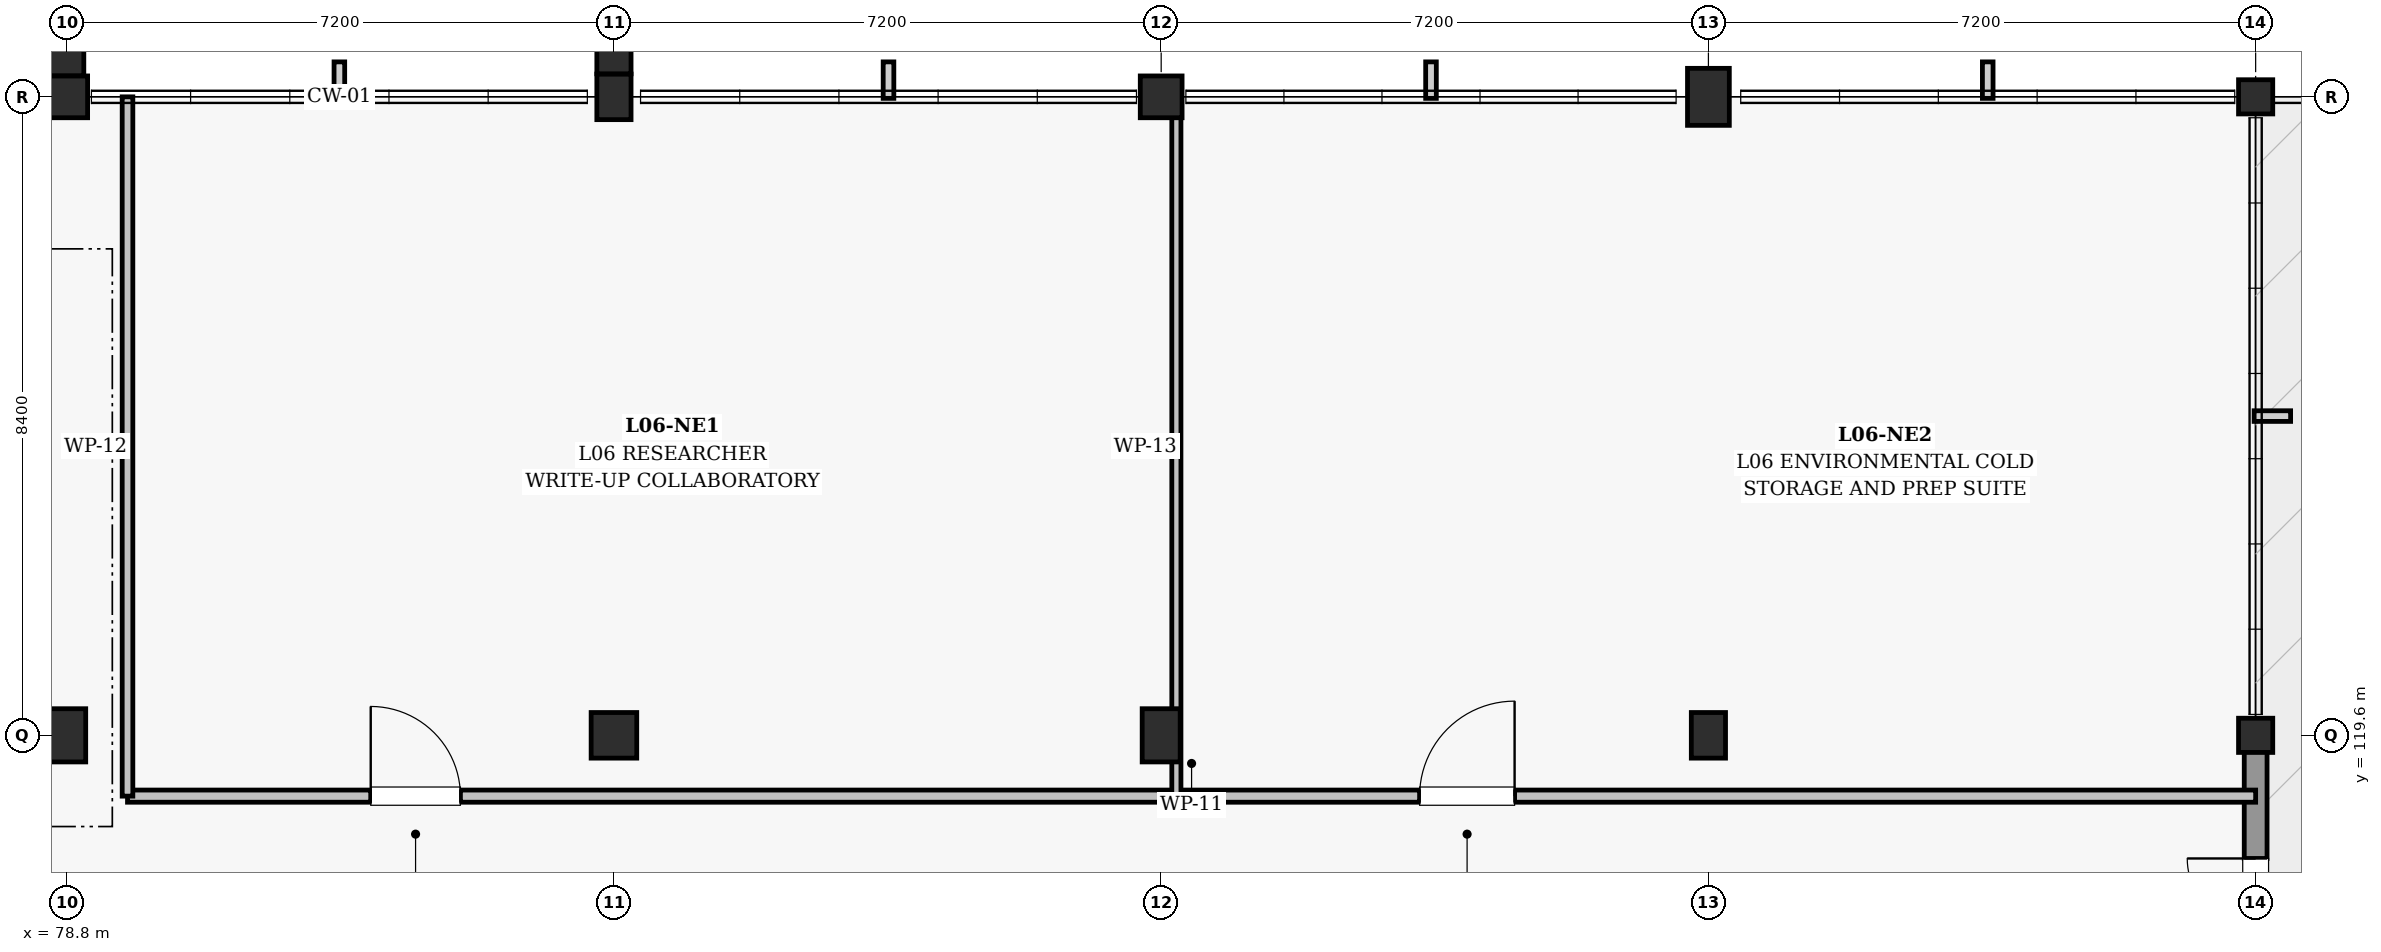
"""IFC4 building model, lengths in metres.
Left out: names, types, materials, properties, quantities, classifications, styles, units other than length and angle.
Written with IfcOpenShell. Run it as: python <this file> out.ifc"""

import sys

from ifc_helpers import new_model, si_unit, direction, frame, frame_2d, origin, origin_2d, place, context, subcontext, project, spatial, rectangle, extrude, element, fill, save


model = new_model("IFC4")
c1 = context("Model", 3, precision=1e-05, world=origin(), true_north=direction((0.0, 1.0)))
c2 = subcontext(c1, "Body", "Model", "MODEL_VIEW")
j1 = project(units=[si_unit("LENGTHUNIT", "METRE"), si_unit("PLANEANGLEUNIT", "RADIAN")], contexts=[c1])
p1 = place(None, origin())
s1 = spatial("IfcSite", under=j1, at=p1, CompositionType="ELEMENT")
p2 = place(p1, origin())
s2 = spatial("IfcBuilding", under=s1, at=p2, CompositionType="ELEMENT")
p3 = place(p2, frame((0.0, 0.0, 27.9)))
s3 = spatial("IfcBuildingStorey", under=s2, at=p3, CompositionType="ELEMENT", Elevation=27.9)
p4 = place(p3, frame((78.8, 119.6, 0.0), z_axis=(0.0, 0.0, 1.0), x_axis=(1.0, 0.0, 0.0)))
e1 = element("IfcColumn", 1, at=p4, inside=s3, PredefinedType="COLUMN", context=c2, shape_type="SweptSolid", body=[
    extrude(rectangle(XDim=0.5, YDim=0.7, at=origin_2d()), origin(), (0.0, 0.0, 1.0), 4.5),
])
p5 = place(p3, frame((78.8, 128.0, 0.0), z_axis=(0.0, 0.0, 1.0), x_axis=(1.0, 0.0, 0.0)))
e2 = element("IfcColumn", 2, at=p5, inside=s3, PredefinedType="COLUMN", context=c2, shape_type="SweptSolid", body=[
    extrude(rectangle(XDim=0.55, YDim=0.55, at=origin_2d()), origin(), (0.0, 0.0, 1.0), 4.5),
])
p6 = place(p3, frame((86.0, 119.6, 0.0), z_axis=(0.0, 0.0, 1.0), x_axis=(1.0, 0.0, 0.0)))
e3 = element("IfcColumn", 3, at=p6, inside=s3, PredefinedType="COLUMN", context=c2, shape_type="SweptSolid", body=[
    extrude(rectangle(XDim=0.6, YDim=0.6, at=origin_2d()), origin(), (0.0, 0.0, 1.0), 4.5),
])
p7 = place(p3, frame((86.0, 128.0, 0.0), z_axis=(0.0, 0.0, 1.0), x_axis=(1.0, 0.0, 0.0)))
e4 = element("IfcColumn", 4, at=p7, inside=s3, PredefinedType="COLUMN", context=c2, shape_type="SweptSolid", body=[
    extrude(rectangle(XDim=0.45, YDim=0.6, at=origin_2d()), origin(), (0.0, 0.0, 1.0), 4.5),
])
p8 = place(p3, frame((93.2, 119.6, 0.0), z_axis=(0.0, 0.0, 1.0), x_axis=(1.0, 0.0, 0.0)))
e5 = element("IfcColumn", 5, at=p8, inside=s3, PredefinedType="COLUMN", context=c2, shape_type="SweptSolid", body=[
    extrude(rectangle(XDim=0.5, YDim=0.7, at=origin_2d()), origin(), (0.0, 0.0, 1.0), 4.5),
])
p9 = place(p3, frame((93.2, 128.0, 0.0), z_axis=(0.0, 0.0, 1.0), x_axis=(1.0, 0.0, 0.0)))
e6 = element("IfcColumn", 6, at=p9, inside=s3, PredefinedType="COLUMN", context=c2, shape_type="SweptSolid", body=[
    extrude(rectangle(XDim=0.55, YDim=0.55, at=origin_2d()), origin(), (0.0, 0.0, 1.0), 4.5),
])
p10 = place(p3, frame((100.4, 119.6, 0.0), z_axis=(0.0, 0.0, 1.0), x_axis=(1.0, 0.0, 0.0)))
e7 = element("IfcColumn", 7, at=p10, inside=s3, PredefinedType="COLUMN", context=c2, shape_type="SweptSolid", body=[
    extrude(rectangle(XDim=0.45, YDim=0.6, at=origin_2d()), origin(), (0.0, 0.0, 1.0), 4.5),
])
p11 = place(p3, frame((100.4, 128.0, 0.0), z_axis=(0.0, 0.0, 1.0), x_axis=(1.0, 0.0, 0.0)))
e8 = element("IfcColumn", 8, at=p11, inside=s3, PredefinedType="COLUMN", context=c2, shape_type="SweptSolid", body=[
    extrude(rectangle(XDim=0.55, YDim=0.75, at=origin_2d()), origin(), (0.0, 0.0, 1.0), 4.5),
])
for number, where, z_axis, x_axis in (
    (9, (107.6, 119.6, 0.0), (0.0, 0.0, 1.0), (1.0, 0.0, 0.0)),
    (10, (107.6, 128.0, 0.0), (0.0, 0.0, 1.0), (1.0, 0.0, 0.0)),
):
    element("IfcColumn", number, at=place(p3, frame(where, z_axis=z_axis, x_axis=x_axis)), inside=s3, PredefinedType="COLUMN", context=c2, shape_type="SweptSolid", body=[
        extrude(rectangle(XDim=0.45, YDim=0.45, at=origin_2d()), origin(), (0.0, 0.0, 1.0), 4.5),
    ])
for number, where, z_axis, x_axis in (
    (11, (78.8, 128.603, 0.0), (0.0, 0.0, 1.0), (1.0, 0.0, 0.0)),
    (12, (86.0, 128.628, 0.0), (0.0, 0.0, 1.0), (1.0, 0.0, 0.0)),
):
    element("IfcColumn", number, at=place(p3, frame(where, z_axis=z_axis, x_axis=x_axis)), inside=s3, PredefinedType="PILASTER", context=c2, shape_type="SweptSolid", body=[
        extrude(rectangle(XDim=0.45, YDim=0.65, at=origin_2d()), origin(), (0.0, 0.0, 1.0), 4.5),
    ])
p12 = place(p3, frame((107.6, 111.38, 0.0), z_axis=(0.0, 0.0, 1.0), x_axis=(0.0, 1.0, 0.0)))
e13 = element("IfcWall", 13, at=p12, inside=s3, PredefinedType="SOLIDWALL", context=c2, shape_type="SweptSolid", body=[
    extrude(rectangle(XDim=8.015, YDim=0.3, at=frame_2d((4.008, 0.0))), origin(), (0.0, 0.0, 1.0), 2.955),
])
p13 = place(p12, frame((4.8, 0.0, 0.0)))
e14 = element("IfcOpeningElement", 14, at=p13, cuts=e13, PredefinedType="OPENING", context=c2, shape_type="SweptSolid", body=[
    extrude(rectangle(XDim=1.8, YDim=2.3, at=frame_2d((0.9, 1.15))), frame((0.0, 0.16, 0.0), z_axis=(0.0, -1.0, 0.0), x_axis=(1.0, 0.0, 0.0)), (0.0, 0.0, 1.0), 0.32),
])
p14 = place(p3, frame((79.6, 118.8, 0.0), z_axis=(0.0, 0.0, 1.0), x_axis=(1.0, 0.0, 0.0)))
e15 = element("IfcWall", 15, at=p14, inside=s3, PredefinedType="PARTITIONING", context=c2, shape_type="SweptSolid", body=[
    extrude(rectangle(XDim=28.0, YDim=0.16, at=frame_2d((14.0, 0.0))), origin(), (0.0, 0.0, 1.0), 3.31),
])
p15 = place(p14, frame((3.2, 0.0, 0.0)))
e16 = element("IfcOpeningElement", 16, at=p15, cuts=e15, PredefinedType="OPENING", context=c2, shape_type="SweptSolid", body=[
    extrude(rectangle(XDim=1.18, YDim=2.2, at=frame_2d((0.59, 1.1))), frame((0.0, 0.09, 0.0), z_axis=(0.0, -1.0, 0.0), x_axis=(1.0, 0.0, 0.0)), (0.0, 0.0, 1.0), 0.18),
])
p16 = place(p14, frame((17.0, 0.0, 0.0)))
e17 = element("IfcOpeningElement", 17, at=p16, cuts=e15, PredefinedType="OPENING", context=c2, shape_type="SweptSolid", body=[
    extrude(rectangle(XDim=1.25, YDim=2.2, at=frame_2d((0.625, 1.1))), frame((0.0, 0.09, 0.0), z_axis=(0.0, -1.0, 0.0), x_axis=(1.0, 0.0, 0.0)), (0.0, 0.0, 1.0), 0.18),
])
p17 = place(p3, frame((79.6, 118.8, 0.0), z_axis=(0.0, 0.0, 1.0), x_axis=(0.0, 1.0, 0.0)))
e18 = element("IfcWall", 18, at=p17, inside=s3, PredefinedType="PARTITIONING", context=c2, shape_type="SweptSolid", body=[
    extrude(rectangle(XDim=9.2, YDim=0.14, at=frame_2d((4.6, 0.0))), origin(), (0.0, 0.0, 1.0), 3.51),
])
p18 = place(p3, frame((93.4, 118.8, 0.0), z_axis=(0.0, 0.0, 1.0), x_axis=(0.0, 1.0, 0.0)))
e19 = element("IfcWall", 19, at=p18, inside=s3, PredefinedType="PARTITIONING", context=c2, shape_type="SweptSolid", body=[
    extrude(rectangle(XDim=9.2, YDim=0.12, at=frame_2d((4.6, 0.0))), origin(), (0.0, 0.0, 1.0), 3.31),
])
p19 = place(p13, origin())
e20 = element("IfcDoor", 20, at=p19, inside=s3, OperationType="DOUBLE_DOOR_SINGLE_SWING", PredefinedType="DOOR", context=c2, shape_type="SweptSolid", body=[
    extrude(rectangle(XDim=1.8, YDim=2.3, at=frame_2d((0.9, 1.15))), frame((0.0, 0.025, 0.0), z_axis=(0.0, -1.0, 0.0), x_axis=(1.0, 0.0, 0.0)), (0.0, 0.0, 1.0), 0.05),
])
fill(e14, e20)
p20 = place(p15, origin())
e21 = element("IfcDoor", 21, at=p20, inside=s3, OperationType="SINGLE_SWING_LEFT", PredefinedType="DOOR", context=c2, shape_type="SweptSolid", body=[
    extrude(rectangle(XDim=1.18, YDim=2.2, at=frame_2d((0.59, 1.1))), frame((0.0, 0.025, 0.0), z_axis=(0.0, -1.0, 0.0), x_axis=(1.0, 0.0, 0.0)), (0.0, 0.0, 1.0), 0.05),
])
fill(e16, e21)
p21 = place(p16, origin())
e22 = element("IfcDoor", 22, at=p21, inside=s3, OperationType="SINGLE_SWING_RIGHT", PredefinedType="DOOR", context=c2, shape_type="SweptSolid", body=[
    extrude(rectangle(XDim=1.25, YDim=2.2, at=frame_2d((0.625, 1.1))), frame((0.0, 0.025, 0.0), z_axis=(0.0, -1.0, 0.0), x_axis=(1.0, 0.0, 0.0)), (0.0, 0.0, 1.0), 0.05),
])
fill(e17, e22)
save(model, sys.argv[1])
